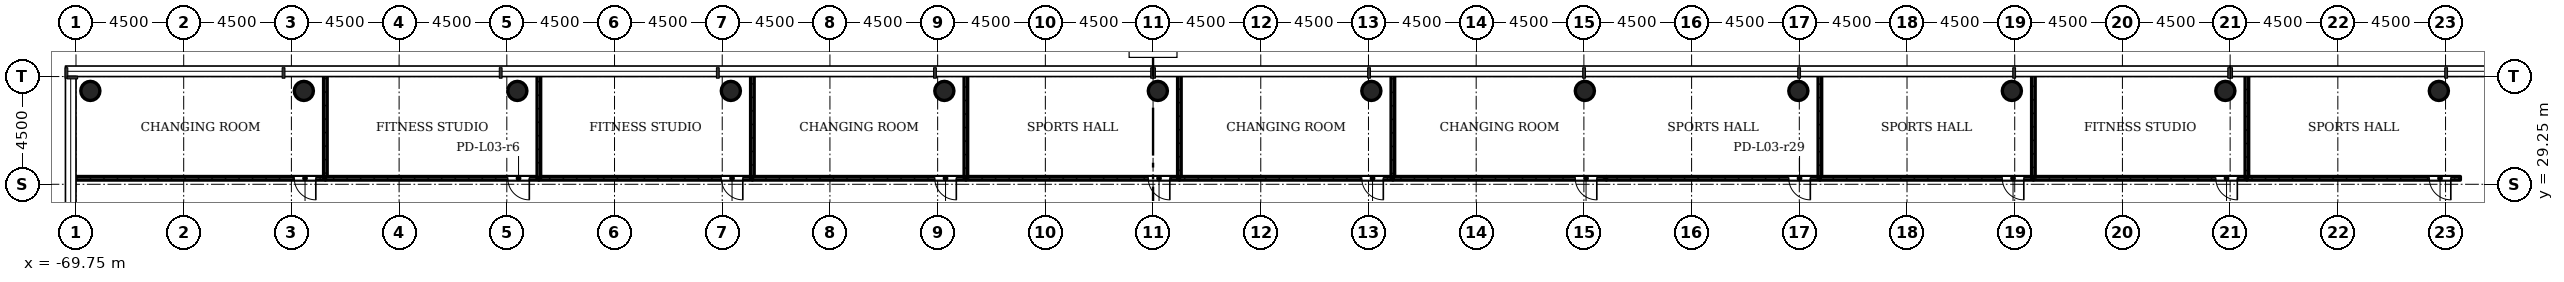
"""IFC4 building model, lengths in metres.
Left out: names, types, materials, properties, quantities, classifications, styles, units other than length and angle.
Written with IfcOpenShell. Run it as: python <this file> out.ifc"""

import sys

from ifc_helpers import new_model, si_unit, direction, frame, frame_2d, origin, origin_2d, place, context, subcontext, project, spatial, rectangle, hollow_circle, extrude, element, fill, save


model = new_model("IFC4")
c1 = context("Model", 3, precision=1e-05, world=origin(), true_north=direction((0.0, 1.0)))
c2 = subcontext(c1, "Body", "Model", "MODEL_VIEW")
j1 = project(units=[si_unit("LENGTHUNIT", "METRE"), si_unit("PLANEANGLEUNIT", "RADIAN")], contexts=[c1])
p1 = place(None, origin())
s1 = spatial("IfcSite", under=j1, at=p1, CompositionType="ELEMENT")
p2 = place(p1, origin())
s2 = spatial("IfcBuilding", under=s1, at=p2, CompositionType="ELEMENT")
p3 = place(p2, frame((0.0, 0.0, 15.5)))
s3 = spatial("IfcBuildingStorey", under=s2, at=p3, CompositionType="ELEMENT", Elevation=15.5)
for number, where, z_axis, x_axis in (
    (1, (-69.15, 33.15, 0.0), (0.0, 0.0, 1.0), (1.0, 0.0, 0.0)),
    (2, (-60.23, 33.15, 0.0), (0.0, 0.0, 1.0), (1.0, 0.0, 0.0)),
    (3, (-51.31, 33.15, 0.0), (0.0, 0.0, 1.0), (1.0, 0.0, 0.0)),
    (4, (-42.39, 33.15, 0.0), (0.0, 0.0, 1.0), (1.0, 0.0, 0.0)),
    (5, (-33.47, 33.15, 0.0), (0.0, 0.0, 1.0), (1.0, 0.0, 0.0)),
    (6, (-24.55, 33.15, 0.0), (0.0, 0.0, 1.0), (1.0, 0.0, 0.0)),
    (7, (-15.63, 33.15, 0.0), (0.0, 0.0, 1.0), (1.0, 0.0, 0.0)),
    (8, (-6.71, 33.15, 0.0), (0.0, 0.0, 1.0), (1.0, 0.0, 0.0)),
    (9, (2.21, 33.15, 0.0), (0.0, 0.0, 1.0), (1.0, 0.0, 0.0)),
    (10, (11.13, 33.15, 0.0), (0.0, 0.0, 1.0), (1.0, 0.0, 0.0)),
    (11, (20.05, 33.15, 0.0), (0.0, 0.0, 1.0), (1.0, 0.0, 0.0)),
    (12, (28.97, 33.15, 0.0), (0.0, 0.0, 1.0), (1.0, 0.0, 0.0)),
):
    element("IfcColumn", number, at=place(p3, frame(where, z_axis=z_axis, x_axis=x_axis)), inside=s3, PredefinedType="COLUMN", context=c2, shape_type="SweptSolid", body=[
        extrude(hollow_circle(Radius=0.4, WallThickness=0.028, at=origin_2d()), origin(), (0.0, 0.0, 1.0), 4.5),
    ])
p4 = place(p3, frame((-59.33, 29.5, 0.0), z_axis=(0.0, 0.0, 1.0), x_axis=(-1.0, 0.0, 0.0)))
e13 = element("IfcWall", 13, at=p4, inside=s3, PredefinedType="PARTITIONING", context=c2, shape_type="SweptSolid", body=[
    extrude(rectangle(XDim=10.52, YDim=0.15, at=frame_2d((5.26, 0.0))), origin(), (0.0, 0.0, 1.0), 4.08),
])
p5 = place(p4, frame((0.4, 0.0, 0.0)))
e14 = element("IfcOpeningElement", 14, at=p5, cuts=e13, PredefinedType="OPENING", context=c2, shape_type="SweptSolid", body=[
    extrude(rectangle(XDim=0.9, YDim=2.1, at=frame_2d((0.45, 1.05))), frame((0.0, 0.085, 0.0), z_axis=(0.0, -1.0, 0.0), x_axis=(1.0, 0.0, 0.0)), (0.0, 0.0, 1.0), 0.17),
])
p6 = place(p3, frame((-59.33, 33.85, 0.0), z_axis=(0.0, 0.0, 1.0), x_axis=(0.0, -1.0, 0.0)))
e15 = element("IfcWall", 15, at=p6, inside=s3, PredefinedType="PARTITIONING", context=c2, shape_type="SweptSolid", body=[
    extrude(rectangle(XDim=4.35, YDim=0.15, at=frame_2d((2.175, 0.0))), origin(), (0.0, 0.0, 1.0), 4.08),
])
p7 = place(p3, frame((-50.41, 29.5, 0.0), z_axis=(0.0, 0.0, 1.0), x_axis=(-1.0, 0.0, 0.0)))
e16 = element("IfcWall", 16, at=p7, inside=s3, PredefinedType="PARTITIONING", context=c2, shape_type="SweptSolid", body=[
    extrude(rectangle(XDim=8.92, YDim=0.15, at=frame_2d((4.46, 0.0))), origin(), (0.0, 0.0, 1.0), 4.08),
])
p8 = place(p7, frame((0.4, 0.0, 0.0)))
e17 = element("IfcOpeningElement", 17, at=p8, cuts=e16, PredefinedType="OPENING", context=c2, shape_type="SweptSolid", body=[
    extrude(rectangle(XDim=0.9, YDim=2.1, at=frame_2d((0.45, 1.05))), frame((0.0, 0.085, 0.0), z_axis=(0.0, -1.0, 0.0), x_axis=(1.0, 0.0, 0.0)), (0.0, 0.0, 1.0), 0.17),
])
p9 = place(p3, frame((-41.49, 29.5, 0.0), z_axis=(0.0, 0.0, 1.0), x_axis=(-1.0, 0.0, 0.0)))
e18 = element("IfcWall", 18, at=p9, inside=s3, PredefinedType="PARTITIONING", context=c2, shape_type="SweptSolid", body=[
    extrude(rectangle(XDim=8.92, YDim=0.15, at=frame_2d((4.46, 0.0))), origin(), (0.0, 0.0, 1.0), 4.08),
])
p10 = place(p9, frame((0.4, 0.0, 0.0)))
e19 = element("IfcOpeningElement", 19, at=p10, cuts=e18, PredefinedType="OPENING", context=c2, shape_type="SweptSolid", body=[
    extrude(rectangle(XDim=0.9, YDim=2.1, at=frame_2d((0.45, 1.05))), frame((0.0, 0.085, 0.0), z_axis=(0.0, -1.0, 0.0), x_axis=(1.0, 0.0, 0.0)), (0.0, 0.0, 1.0), 0.17),
])
for number, where, z_axis, x_axis in (
    (20, (-50.41, 29.5, 0.0), (0.0, 0.0, 1.0), (0.0, 1.0, 0.0)),
    (21, (-41.49, 33.85, 0.0), (0.0, 0.0, 1.0), (0.0, -1.0, 0.0)),
):
    element("IfcWall", number, at=place(p3, frame(where, z_axis=z_axis, x_axis=x_axis)), inside=s3, PredefinedType="PARTITIONING", context=c2, shape_type="SweptSolid", body=[
        extrude(rectangle(XDim=4.35, YDim=0.15, at=frame_2d((2.175, 0.0))), origin(), (0.0, 0.0, 1.0), 4.08),
    ])
p11 = place(p3, frame((-32.57, 29.5, 0.0), z_axis=(0.0, 0.0, 1.0), x_axis=(-1.0, 0.0, 0.0)))
e22 = element("IfcWall", 22, at=p11, inside=s3, PredefinedType="PARTITIONING", context=c2, shape_type="SweptSolid", body=[
    extrude(rectangle(XDim=8.92, YDim=0.15, at=frame_2d((4.46, 0.0))), origin(), (0.0, 0.0, 1.0), 4.08),
])
p12 = place(p11, frame((0.4, 0.0, 0.0)))
e23 = element("IfcOpeningElement", 23, at=p12, cuts=e22, PredefinedType="OPENING", context=c2, shape_type="SweptSolid", body=[
    extrude(rectangle(XDim=0.9, YDim=2.1, at=frame_2d((0.45, 1.05))), frame((0.0, 0.085, 0.0), z_axis=(0.0, -1.0, 0.0), x_axis=(1.0, 0.0, 0.0)), (0.0, 0.0, 1.0), 0.17),
])
p13 = place(p3, frame((-32.57, 33.85, 0.0), z_axis=(0.0, 0.0, 1.0), x_axis=(0.0, -1.0, 0.0)))
e24 = element("IfcWall", 24, at=p13, inside=s3, PredefinedType="PARTITIONING", context=c2, shape_type="SweptSolid", body=[
    extrude(rectangle(XDim=4.35, YDim=0.15, at=frame_2d((2.175, 0.0))), origin(), (0.0, 0.0, 1.0), 4.08),
])
p14 = place(p3, frame((-23.65, 29.5, 0.0), z_axis=(0.0, 0.0, 1.0), x_axis=(-1.0, 0.0, 0.0)))
e25 = element("IfcWall", 25, at=p14, inside=s3, PredefinedType="PARTITIONING", context=c2, shape_type="SweptSolid", body=[
    extrude(rectangle(XDim=8.92, YDim=0.15, at=frame_2d((4.46, 0.0))), origin(), (0.0, 0.0, 1.0), 4.08),
])
p15 = place(p14, frame((0.4, 0.0, 0.0)))
e26 = element("IfcOpeningElement", 26, at=p15, cuts=e25, PredefinedType="OPENING", context=c2, shape_type="SweptSolid", body=[
    extrude(rectangle(XDim=0.9, YDim=2.1, at=frame_2d((0.45, 1.05))), frame((0.0, 0.085, 0.0), z_axis=(0.0, -1.0, 0.0), x_axis=(1.0, 0.0, 0.0)), (0.0, 0.0, 1.0), 0.17),
])
p16 = place(p3, frame((-23.65, 33.85, 0.0), z_axis=(0.0, 0.0, 1.0), x_axis=(0.0, -1.0, 0.0)))
e27 = element("IfcWall", 27, at=p16, inside=s3, PredefinedType="PARTITIONING", context=c2, shape_type="SweptSolid", body=[
    extrude(rectangle(XDim=4.35, YDim=0.15, at=frame_2d((2.175, 0.0))), origin(), (0.0, 0.0, 1.0), 4.08),
])
p17 = place(p3, frame((-14.73, 29.5, 0.0), z_axis=(0.0, 0.0, 1.0), x_axis=(-1.0, 0.0, 0.0)))
e28 = element("IfcWall", 28, at=p17, inside=s3, PredefinedType="PARTITIONING", context=c2, shape_type="SweptSolid", body=[
    extrude(rectangle(XDim=8.92, YDim=0.15, at=frame_2d((4.46, 0.0))), origin(), (0.0, 0.0, 1.0), 4.08),
])
p18 = place(p17, frame((0.4, 0.0, 0.0)))
e29 = element("IfcOpeningElement", 29, at=p18, cuts=e28, PredefinedType="OPENING", context=c2, shape_type="SweptSolid", body=[
    extrude(rectangle(XDim=0.9, YDim=2.1, at=frame_2d((0.45, 1.05))), frame((0.0, 0.085, 0.0), z_axis=(0.0, -1.0, 0.0), x_axis=(1.0, 0.0, 0.0)), (0.0, 0.0, 1.0), 0.17),
])
p19 = place(p3, frame((-14.73, 33.85, 0.0), z_axis=(0.0, 0.0, 1.0), x_axis=(0.0, -1.0, 0.0)))
e30 = element("IfcWall", 30, at=p19, inside=s3, PredefinedType="PARTITIONING", context=c2, shape_type="SweptSolid", body=[
    extrude(rectangle(XDim=4.35, YDim=0.15, at=frame_2d((2.175, 0.0))), origin(), (0.0, 0.0, 1.0), 4.08),
])
p20 = place(p3, frame((-5.81, 29.5, 0.0), z_axis=(0.0, 0.0, 1.0), x_axis=(-1.0, 0.0, 0.0)))
e31 = element("IfcWall", 31, at=p20, inside=s3, PredefinedType="PARTITIONING", context=c2, shape_type="SweptSolid", body=[
    extrude(rectangle(XDim=8.92, YDim=0.15, at=frame_2d((4.46, 0.0))), origin(), (0.0, 0.0, 1.0), 4.08),
])
p21 = place(p20, frame((0.4, 0.0, 0.0)))
e32 = element("IfcOpeningElement", 32, at=p21, cuts=e31, PredefinedType="OPENING", context=c2, shape_type="SweptSolid", body=[
    extrude(rectangle(XDim=0.9, YDim=2.1, at=frame_2d((0.45, 1.05))), frame((0.0, 0.085, 0.0), z_axis=(0.0, -1.0, 0.0), x_axis=(1.0, 0.0, 0.0)), (0.0, 0.0, 1.0), 0.17),
])
p22 = place(p3, frame((3.11, 29.5, 0.0), z_axis=(0.0, 0.0, 1.0), x_axis=(-1.0, 0.0, 0.0)))
e33 = element("IfcWall", 33, at=p22, inside=s3, PredefinedType="PARTITIONING", context=c2, shape_type="SweptSolid", body=[
    extrude(rectangle(XDim=8.92, YDim=0.15, at=frame_2d((4.46, 0.0))), origin(), (0.0, 0.0, 1.0), 4.08),
])
p23 = place(p22, frame((0.4, 0.0, 0.0)))
e34 = element("IfcOpeningElement", 34, at=p23, cuts=e33, PredefinedType="OPENING", context=c2, shape_type="SweptSolid", body=[
    extrude(rectangle(XDim=0.9, YDim=2.1, at=frame_2d((0.45, 1.05))), frame((0.0, 0.085, 0.0), z_axis=(0.0, -1.0, 0.0), x_axis=(1.0, 0.0, 0.0)), (0.0, 0.0, 1.0), 0.17),
])
p24 = place(p3, frame((3.11, 33.85, 0.0), z_axis=(0.0, 0.0, 1.0), x_axis=(0.0, -1.0, 0.0)))
e35 = element("IfcWall", 35, at=p24, inside=s3, PredefinedType="PARTITIONING", context=c2, shape_type="SweptSolid", body=[
    extrude(rectangle(XDim=4.35, YDim=0.15, at=frame_2d((2.175, 0.0))), origin(), (0.0, 0.0, 1.0), 4.08),
])
p25 = place(p3, frame((12.03, 29.5, 0.0), z_axis=(0.0, 0.0, 1.0), x_axis=(-1.0, 0.0, 0.0)))
e36 = element("IfcWall", 36, at=p25, inside=s3, PredefinedType="PARTITIONING", context=c2, shape_type="SweptSolid", body=[
    extrude(rectangle(XDim=8.92, YDim=0.15, at=frame_2d((4.46, 0.0))), origin(), (0.0, 0.0, 1.0), 4.08),
])
p26 = place(p25, frame((0.4, 0.0, 0.0)))
e37 = element("IfcOpeningElement", 37, at=p26, cuts=e36, PredefinedType="OPENING", context=c2, shape_type="SweptSolid", body=[
    extrude(rectangle(XDim=0.9, YDim=2.1, at=frame_2d((0.45, 1.05))), frame((0.0, 0.085, 0.0), z_axis=(0.0, -1.0, 0.0), x_axis=(1.0, 0.0, 0.0)), (0.0, 0.0, 1.0), 0.17),
])
p27 = place(p3, frame((12.03, 33.85, 0.0), z_axis=(0.0, 0.0, 1.0), x_axis=(0.0, -1.0, 0.0)))
e38 = element("IfcWall", 38, at=p27, inside=s3, PredefinedType="PARTITIONING", context=c2, shape_type="SweptSolid", body=[
    extrude(rectangle(XDim=4.35, YDim=0.15, at=frame_2d((2.175, 0.0))), origin(), (0.0, 0.0, 1.0), 4.08),
])
p28 = place(p3, frame((20.95, 29.5, 0.0), z_axis=(0.0, 0.0, 1.0), x_axis=(-1.0, 0.0, 0.0)))
e39 = element("IfcWall", 39, at=p28, inside=s3, PredefinedType="PARTITIONING", context=c2, shape_type="SweptSolid", body=[
    extrude(rectangle(XDim=8.92, YDim=0.15, at=frame_2d((4.46, 0.0))), origin(), (0.0, 0.0, 1.0), 4.08),
])
p29 = place(p28, frame((0.4, 0.0, 0.0)))
e40 = element("IfcOpeningElement", 40, at=p29, cuts=e39, PredefinedType="OPENING", context=c2, shape_type="SweptSolid", body=[
    extrude(rectangle(XDim=0.9, YDim=2.1, at=frame_2d((0.45, 1.05))), frame((0.0, 0.085, 0.0), z_axis=(0.0, -1.0, 0.0), x_axis=(1.0, 0.0, 0.0)), (0.0, 0.0, 1.0), 0.17),
])
p30 = place(p3, frame((20.95, 33.85, 0.0), z_axis=(0.0, 0.0, 1.0), x_axis=(0.0, -1.0, 0.0)))
e41 = element("IfcWall", 41, at=p30, inside=s3, PredefinedType="PARTITIONING", context=c2, shape_type="SweptSolid", body=[
    extrude(rectangle(XDim=4.35, YDim=0.15, at=frame_2d((2.175, 0.0))), origin(), (0.0, 0.0, 1.0), 4.08),
])
p31 = place(p3, frame((29.87, 29.5, 0.0), z_axis=(0.0, 0.0, 1.0), x_axis=(-1.0, 0.0, 0.0)))
e42 = element("IfcWall", 42, at=p31, inside=s3, PredefinedType="PARTITIONING", context=c2, shape_type="SweptSolid", body=[
    extrude(rectangle(XDim=8.92, YDim=0.15, at=frame_2d((4.46, 0.0))), origin(), (0.0, 0.0, 1.0), 4.08),
])
p32 = place(p31, frame((0.4, 0.0, 0.0)))
e43 = element("IfcOpeningElement", 43, at=p32, cuts=e42, PredefinedType="OPENING", context=c2, shape_type="SweptSolid", body=[
    extrude(rectangle(XDim=0.9, YDim=2.1, at=frame_2d((0.45, 1.05))), frame((0.0, 0.085, 0.0), z_axis=(0.0, -1.0, 0.0), x_axis=(1.0, 0.0, 0.0)), (0.0, 0.0, 1.0), 0.17),
])
p33 = place(p5, origin())
e44 = element("IfcDoor", 44, at=p33, inside=s3, OperationType="SINGLE_SWING_RIGHT", PredefinedType="DOOR", context=c2, shape_type="SweptSolid", body=[
    extrude(rectangle(XDim=0.9, YDim=2.1, at=frame_2d((0.45, 1.05))), frame((0.0, 0.025, 0.0), z_axis=(0.0, -1.0, 0.0), x_axis=(1.0, 0.0, 0.0)), (0.0, 0.0, 1.0), 0.05),
])
fill(e14, e44)
p34 = place(p8, origin())
e45 = element("IfcDoor", 45, at=p34, inside=s3, OperationType="SINGLE_SWING_RIGHT", PredefinedType="DOOR", context=c2, shape_type="SweptSolid", body=[
    extrude(rectangle(XDim=0.9, YDim=2.1, at=frame_2d((0.45, 1.05))), frame((0.0, 0.025, 0.0), z_axis=(0.0, -1.0, 0.0), x_axis=(1.0, 0.0, 0.0)), (0.0, 0.0, 1.0), 0.05),
])
fill(e17, e45)
p35 = place(p10, origin())
e46 = element("IfcDoor", 46, at=p35, inside=s3, OperationType="SINGLE_SWING_RIGHT", PredefinedType="DOOR", context=c2, shape_type="SweptSolid", body=[
    extrude(rectangle(XDim=0.9, YDim=2.1, at=frame_2d((0.45, 1.05))), frame((0.0, 0.025, 0.0), z_axis=(0.0, -1.0, 0.0), x_axis=(1.0, 0.0, 0.0)), (0.0, 0.0, 1.0), 0.05),
])
fill(e19, e46)
p36 = place(p12, origin())
e47 = element("IfcDoor", 47, at=p36, inside=s3, OperationType="SINGLE_SWING_RIGHT", PredefinedType="DOOR", context=c2, shape_type="SweptSolid", body=[
    extrude(rectangle(XDim=0.9, YDim=2.1, at=frame_2d((0.45, 1.05))), frame((0.0, 0.025, 0.0), z_axis=(0.0, -1.0, 0.0), x_axis=(1.0, 0.0, 0.0)), (0.0, 0.0, 1.0), 0.05),
])
fill(e23, e47)
p37 = place(p15, origin())
e48 = element("IfcDoor", 48, at=p37, inside=s3, OperationType="SINGLE_SWING_RIGHT", PredefinedType="DOOR", context=c2, shape_type="SweptSolid", body=[
    extrude(rectangle(XDim=0.9, YDim=2.1, at=frame_2d((0.45, 1.05))), frame((0.0, 0.025, 0.0), z_axis=(0.0, -1.0, 0.0), x_axis=(1.0, 0.0, 0.0)), (0.0, 0.0, 1.0), 0.05),
])
fill(e26, e48)
p38 = place(p18, origin())
e49 = element("IfcDoor", 49, at=p38, inside=s3, OperationType="SINGLE_SWING_RIGHT", PredefinedType="DOOR", context=c2, shape_type="SweptSolid", body=[
    extrude(rectangle(XDim=0.9, YDim=2.1, at=frame_2d((0.45, 1.05))), frame((0.0, 0.025, 0.0), z_axis=(0.0, -1.0, 0.0), x_axis=(1.0, 0.0, 0.0)), (0.0, 0.0, 1.0), 0.05),
])
fill(e29, e49)
p39 = place(p21, origin())
e50 = element("IfcDoor", 50, at=p39, inside=s3, OperationType="SINGLE_SWING_RIGHT", PredefinedType="DOOR", context=c2, shape_type="SweptSolid", body=[
    extrude(rectangle(XDim=0.9, YDim=2.1, at=frame_2d((0.45, 1.05))), frame((0.0, 0.025, 0.0), z_axis=(0.0, -1.0, 0.0), x_axis=(1.0, 0.0, 0.0)), (0.0, 0.0, 1.0), 0.05),
])
fill(e32, e50)
p40 = place(p23, origin())
e51 = element("IfcDoor", 51, at=p40, inside=s3, OperationType="SINGLE_SWING_RIGHT", PredefinedType="DOOR", context=c2, shape_type="SweptSolid", body=[
    extrude(rectangle(XDim=0.9, YDim=2.1, at=frame_2d((0.45, 1.05))), frame((0.0, 0.025, 0.0), z_axis=(0.0, -1.0, 0.0), x_axis=(1.0, 0.0, 0.0)), (0.0, 0.0, 1.0), 0.05),
])
fill(e34, e51)
p41 = place(p26, origin())
e52 = element("IfcDoor", 52, at=p41, inside=s3, OperationType="SINGLE_SWING_RIGHT", PredefinedType="DOOR", context=c2, shape_type="SweptSolid", body=[
    extrude(rectangle(XDim=0.9, YDim=2.1, at=frame_2d((0.45, 1.05))), frame((0.0, 0.025, 0.0), z_axis=(0.0, -1.0, 0.0), x_axis=(1.0, 0.0, 0.0)), (0.0, 0.0, 1.0), 0.05),
])
fill(e37, e52)
p42 = place(p29, origin())
e53 = element("IfcDoor", 53, at=p42, inside=s3, OperationType="SINGLE_SWING_RIGHT", PredefinedType="DOOR", context=c2, shape_type="SweptSolid", body=[
    extrude(rectangle(XDim=0.9, YDim=2.1, at=frame_2d((0.45, 1.05))), frame((0.0, 0.025, 0.0), z_axis=(0.0, -1.0, 0.0), x_axis=(1.0, 0.0, 0.0)), (0.0, 0.0, 1.0), 0.05),
])
fill(e40, e53)
p43 = place(p32, origin())
e54 = element("IfcDoor", 54, at=p43, inside=s3, OperationType="SINGLE_SWING_RIGHT", PredefinedType="DOOR", context=c2, shape_type="SweptSolid", body=[
    extrude(rectangle(XDim=0.9, YDim=2.1, at=frame_2d((0.45, 1.05))), frame((0.0, 0.025, 0.0), z_axis=(0.0, -1.0, 0.0), x_axis=(1.0, 0.0, 0.0)), (0.0, 0.0, 1.0), 0.05),
])
fill(e43, e54)
save(model, sys.argv[1])
